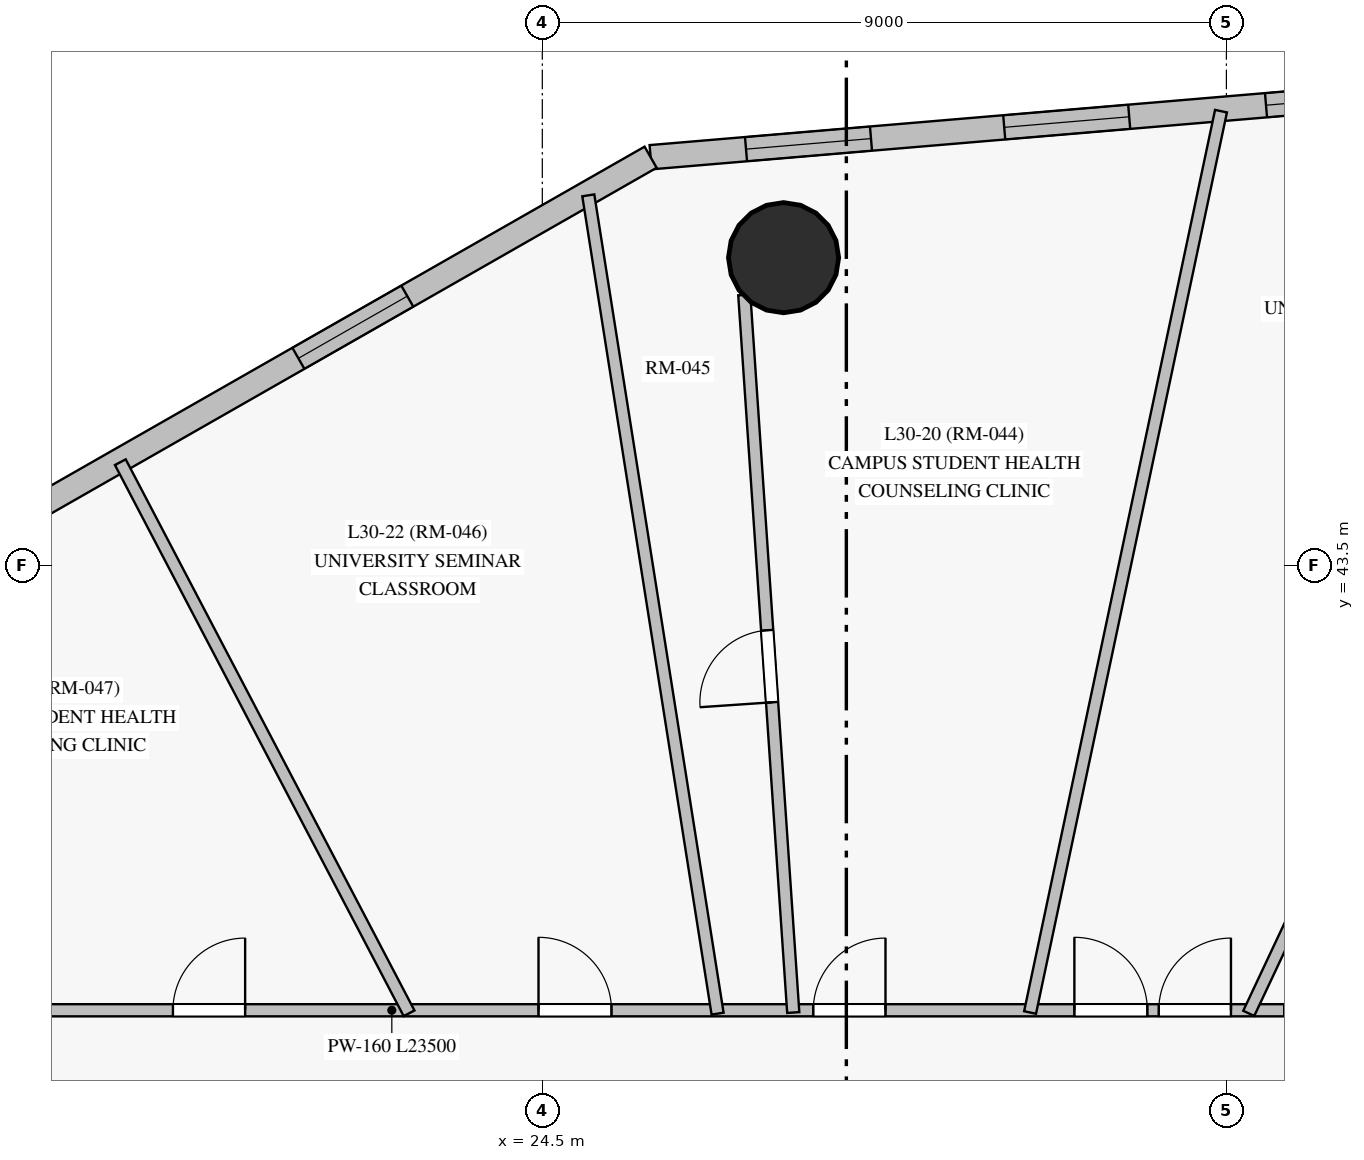
"""IFC4 building model, lengths in metres.
Left out: names, types, materials, properties, quantities, classifications, styles, units other than length and angle.
Written with IfcOpenShell. Run it as: python <this file> out.ifc"""

import sys

from ifc_helpers import new_model, si_unit, direction, frame, frame_2d, origin, origin_with_axes, origin_2d, place, context, subcontext, project, spatial, rectangle, circle, extrude, source, transform, mapped, element, fill, save


model = new_model("IFC4")
c1 = context("Model", 3, precision=1e-05, world=origin(), true_north=direction((0.0, 1.0)))
c2 = subcontext(c1, "Body", "Model", "MODEL_VIEW")
j1 = project(units=[si_unit("LENGTHUNIT", "METRE"), si_unit("PLANEANGLEUNIT", "RADIAN")], contexts=[c1])
p1 = place(None, origin())
s1 = spatial("IfcSite", under=j1, at=p1, CompositionType="ELEMENT")
p2 = place(p1, origin())
s2 = spatial("IfcBuilding", under=s1, at=p2, CompositionType="ELEMENT")
p3 = place(p2, frame((0.0, 0.0, 111.45)))
s3 = spatial("IfcBuildingStorey", under=s2, at=p3, CompositionType="ELEMENT", Elevation=111.45)
m1 = source(origin_with_axes(), c2, "Body", "SweptSolid", [
    extrude(circle(Radius=0.725, at=origin_2d()), origin(), (0.0, 0.0, 1.0), 3.05),
])
p4 = place(p3, frame((27.674, 47.551, 0.0), z_axis=(0.0, 0.0, 1.0), x_axis=(1.0, 0.0, 0.0)))
e1 = element("IfcColumn", 1, at=p4, inside=s3, PredefinedType="COLUMN", context=c2, shape_type="MappedRepresentation", body=[
    mapped(m1, transform((0.0, 0.0, 0.0), scale=1.0)),
])
p5 = place(p3, frame((35.632, 49.693, 0.0), z_axis=(0.0, 0.0, 1.0), x_axis=(-0.996452673848, -0.084155028263, 0.0)))
e2 = element("IfcWall", 2, at=p5, inside=s3, PredefinedType="SOLIDWALL", context=c2, shape_type="SweptSolid", body=[
    extrude(rectangle(XDim=9.742, YDim=0.32, at=frame_2d((4.871, 0.0))), origin(), (0.0, 0.0, 1.0), 2.825),
])
p6 = place(p5, frame((0.667, 0.0, 0.85)))
e3 = element("IfcOpeningElement", 3, at=p6, cuts=e2, PredefinedType="OPENING", context=c2, shape_type="SweptSolid", body=[
    extrude(rectangle(XDim=0.95, YDim=1.5, at=frame_2d((0.475, 0.75))), frame((0.0, 0.17, 0.0), z_axis=(0.0, -1.0, 0.0), x_axis=(1.0, 0.0, 0.0)), (0.0, 0.0, 1.0), 0.34),
])
p7 = place(p5, frame((3.423, 0.0, 0.85)))
e4 = element("IfcOpeningElement", 4, at=p7, cuts=e2, PredefinedType="OPENING", context=c2, shape_type="SweptSolid", body=[
    extrude(rectangle(XDim=1.65, YDim=1.65, at=frame_2d((0.825, 0.825))), frame((0.0, 0.17, 0.0), z_axis=(0.0, -1.0, 0.0), x_axis=(1.0, 0.0, 0.0)), (0.0, 0.0, 1.0), 0.34),
])
p8 = place(p5, frame((6.833, 0.0, 0.85)))
e5 = element("IfcOpeningElement", 5, at=p8, cuts=e2, PredefinedType="OPENING", context=c2, shape_type="SweptSolid", body=[
    extrude(rectangle(XDim=1.65, YDim=1.65, at=frame_2d((0.825, 0.825))), frame((0.0, 0.17, 0.0), z_axis=(0.0, -1.0, 0.0), x_axis=(1.0, 0.0, 0.0)), (0.0, 0.0, 1.0), 0.34),
])
p9 = place(p3, frame((25.925, 48.873, 0.0), z_axis=(0.0, 0.0, 1.0), x_axis=(-0.868415696325, -0.495836846529, 0.0)))
e6 = element("IfcWall", 6, at=p9, inside=s3, PredefinedType="SOLIDWALL", context=c2, shape_type="SweptSolid", body=[
    extrude(rectangle(XDim=14.101, YDim=0.32, at=frame_2d((7.05, 0.0))), origin(), (0.0, 0.0, 1.0), 2.825),
])
p10 = place(p9, frame((3.686, 0.0, 0.85)))
e7 = element("IfcOpeningElement", 7, at=p10, cuts=e6, PredefinedType="OPENING", context=c2, shape_type="SweptSolid", body=[
    extrude(rectangle(XDim=1.65, YDim=1.65, at=frame_2d((0.825, 0.825))), frame((0.0, 0.17, 0.0), z_axis=(0.0, -1.0, 0.0), x_axis=(1.0, 0.0, 0.0)), (0.0, 0.0, 1.0), 0.34),
])
p11 = place(p9, frame((10.22, 0.0, 0.85)))
e8 = element("IfcOpeningElement", 8, at=p11, cuts=e6, PredefinedType="OPENING", context=c2, shape_type="SweptSolid", body=[
    extrude(rectangle(XDim=1.65, YDim=1.65, at=frame_2d((0.825, 0.825))), frame((0.0, 0.17, 0.0), z_axis=(0.0, -1.0, 0.0), x_axis=(1.0, 0.0, 0.0)), (0.0, 0.0, 1.0), 0.34),
])
p12 = place(p3, frame((16.7, 37.65, 0.0), z_axis=(0.0, 0.0, 1.0), x_axis=(1.0, 0.0, 0.0)))
e9 = element("IfcWall", 9, at=p12, inside=s3, PredefinedType="PARTITIONING", context=c2, shape_type="SweptSolid", body=[
    extrude(rectangle(XDim=23.5, YDim=0.16, at=frame_2d((11.75, 0.0))), origin(), (0.0, 0.0, 1.0), 2.325),
])
p13 = place(p12, frame((20.456, 0.0, 0.0)))
e10 = element("IfcOpeningElement", 10, at=p13, cuts=e9, PredefinedType="OPENING", context=c2, shape_type="SweptSolid", body=[
    extrude(rectangle(XDim=0.96, YDim=2.15, at=frame_2d((0.48, 1.075))), frame((0.0, 0.09, 0.0), z_axis=(0.0, -1.0, 0.0), x_axis=(1.0, 0.0, 0.0)), (0.0, 0.0, 1.0), 0.18),
])
p14 = place(p12, frame((19.359, 0.0, 0.0)))
e11 = element("IfcOpeningElement", 11, at=p14, cuts=e9, PredefinedType="OPENING", context=c2, shape_type="SweptSolid", body=[
    extrude(rectangle(XDim=0.95, YDim=2.15, at=frame_2d((0.475, 1.075))), frame((0.0, 0.09, 0.0), z_axis=(0.0, -1.0, 0.0), x_axis=(1.0, 0.0, 0.0)), (0.0, 0.0, 1.0), 0.18),
])
p15 = place(p12, frame((15.91, 0.0, 0.0)))
e12 = element("IfcOpeningElement", 12, at=p15, cuts=e9, PredefinedType="OPENING", context=c2, shape_type="SweptSolid", body=[
    extrude(rectangle(XDim=0.95, YDim=2.15, at=frame_2d((0.475, 1.075))), frame((0.0, 0.09, 0.0), z_axis=(0.0, -1.0, 0.0), x_axis=(1.0, 0.0, 0.0)), (0.0, 0.0, 1.0), 0.18),
])
p16 = place(p12, frame((14.8, 0.0, 0.0)))
e13 = element("IfcOpeningElement", 13, at=p16, cuts=e9, PredefinedType="OPENING", context=c2, shape_type="SweptSolid", body=[
    extrude(rectangle(XDim=0.96, YDim=2.15, at=frame_2d((0.48, 1.075))), frame((0.0, 0.09, 0.0), z_axis=(0.0, -1.0, 0.0), x_axis=(1.0, 0.0, 0.0)), (0.0, 0.0, 1.0), 0.18),
])
p17 = place(p12, frame((11.365, 0.0, 0.0)))
e14 = element("IfcOpeningElement", 14, at=p17, cuts=e9, PredefinedType="OPENING", context=c2, shape_type="SweptSolid", body=[
    extrude(rectangle(XDim=0.95, YDim=2.15, at=frame_2d((0.475, 1.075))), frame((0.0, 0.09, 0.0), z_axis=(0.0, -1.0, 0.0), x_axis=(1.0, 0.0, 0.0)), (0.0, 0.0, 1.0), 0.18),
])
p18 = place(p12, frame((7.75, 0.0, 0.0)))
e15 = element("IfcOpeningElement", 15, at=p18, cuts=e9, PredefinedType="OPENING", context=c2, shape_type="SweptSolid", body=[
    extrude(rectangle(XDim=0.96, YDim=2.15, at=frame_2d((0.48, 1.075))), frame((0.0, 0.09, 0.0), z_axis=(0.0, -1.0, 0.0), x_axis=(1.0, 0.0, 0.0)), (0.0, 0.0, 1.0), 0.18),
])
p19 = place(p12, frame((2.94, 0.0, 0.0)))
e16 = element("IfcOpeningElement", 16, at=p19, cuts=e9, PredefinedType="OPENING", context=c2, shape_type="SweptSolid", body=[
    extrude(rectangle(XDim=0.95, YDim=2.15, at=frame_2d((0.475, 1.075))), frame((0.0, 0.09, 0.0), z_axis=(0.0, -1.0, 0.0), x_axis=(1.0, 0.0, 0.0)), (0.0, 0.0, 1.0), 0.18),
])
p20 = place(p12, frame((17.561, 0.0, 0.0)))
e17 = element("IfcOpeningElement", 17, at=p20, cuts=e9, PredefinedType="OPENING", context=c2, shape_type="SweptSolid", body=[
    extrude(rectangle(XDim=0.86, YDim=2.04, at=frame_2d((0.43, 1.02))), frame((0.0, 0.09, 0.0), z_axis=(0.0, -1.0, 0.0), x_axis=(1.0, 0.0, 0.0)), (0.0, 0.0, 1.0), 0.18),
])
p21 = place(p3, frame((30.917, 37.621, 0.0), z_axis=(0.0, 0.0, 1.0), x_axis=(0.207235529674, 0.978291078995, 0.0)))
e18 = element("IfcWall", 18, at=p21, inside=s3, PredefinedType="PARTITIONING", context=c2, shape_type="SweptSolid", body=[
    extrude(rectangle(XDim=12.121, YDim=0.16, at=frame_2d((6.061, 0.0))), origin(), (0.0, 0.0, 1.0), 2.825),
])
p22 = place(p3, frame((33.794, 37.609, 0.0), z_axis=(0.0, 0.0, 1.0), x_axis=(0.425784012036, 0.904824831166, 0.0)))
e19 = element("IfcWall", 19, at=p22, inside=s3, PredefinedType="PARTITIONING", context=c2, shape_type="SweptSolid", body=[
    extrude(rectangle(XDim=11.736, YDim=0.16, at=frame_2d((5.868, 0.0))), origin(), (0.0, 0.0, 1.0), 2.825),
])
p23 = place(p3, frame((26.806, 37.606, 0.0), z_axis=(0.0, 0.0, 1.0), x_axis=(-0.156063798383, 0.987746977132, 0.0)))
e20 = element("IfcWall", 20, at=p23, inside=s3, PredefinedType="PARTITIONING", context=c2, shape_type="SweptSolid", body=[
    extrude(rectangle(XDim=10.899, YDim=0.16, at=frame_2d((5.449, 0.0))), origin(), (0.0, 0.0, 1.0), 2.225),
])
p24 = place(p3, frame((27.802, 37.62, 0.0), z_axis=(0.0, 0.0, 1.0), x_axis=(-0.068058322418, 0.997681344293, 0.0)))
e21 = element("IfcWall", 21, at=p24, inside=s3, PredefinedType="PARTITIONING", context=c2, shape_type="SweptSolid", body=[
    extrude(rectangle(XDim=9.463, YDim=0.16, at=frame_2d((4.731, 0.0))), origin(), (0.0, 0.0, 1.0), 2.225),
])
p25 = place(p24, frame((4.091, 0.0, 0.0)))
e22 = element("IfcOpeningElement", 22, at=p25, cuts=e21, PredefinedType="OPENING", context=c2, shape_type="SweptSolid", body=[
    extrude(rectangle(XDim=0.95, YDim=2.15, at=frame_2d((0.475, 1.075))), frame((0.0, 0.09, 0.0), z_axis=(0.0, -1.0, 0.0), x_axis=(1.0, 0.0, 0.0)), (0.0, 0.0, 1.0), 0.18),
])
p26 = place(p3, frame((22.747, 37.61, 0.0), z_axis=(0.0, 0.0, 1.0), x_axis=(-0.464074979272, 0.885795920974, 0.0)))
e23 = element("IfcWall", 23, at=p26, inside=s3, PredefinedType="PARTITIONING", context=c2, shape_type="SweptSolid", body=[
    extrude(rectangle(XDim=8.185, YDim=0.16, at=frame_2d((4.093, 0.0))), origin(), (0.0, 0.0, 1.0), 2.825),
])
m2 = source(origin_with_axes(), c2, "Body", "SweptSolid", [
    extrude(rectangle(XDim=0.95, YDim=1.5, at=frame_2d((0.475, 0.75))), frame((0.0, 0.03, 0.0), z_axis=(0.0, -1.0, 0.0), x_axis=(1.0, 0.0, 0.0)), (0.0, 0.0, 1.0), 0.06),
])
p27 = place(p6, origin())
e24 = element("IfcWindow", 24, at=p27, inside=s3, PartitioningType="SINGLE_PANEL", PredefinedType="WINDOW", context=c2, shape_type="MappedRepresentation", body=[
    mapped(m2, transform((0.0, 0.0, 0.0), scale=1.0)),
])
fill(e3, e24)
m3 = source(origin_with_axes(), c2, "Body", "SweptSolid", [
    extrude(rectangle(XDim=1.65, YDim=1.65, at=frame_2d((0.825, 0.825))), frame((0.0, 0.03, 0.0), z_axis=(0.0, -1.0, 0.0), x_axis=(1.0, 0.0, 0.0)), (0.0, 0.0, 1.0), 0.06),
])
p28 = place(p7, origin())
e25 = element("IfcWindow", 25, at=p28, inside=s3, PartitioningType="SINGLE_PANEL", PredefinedType="WINDOW", context=c2, shape_type="MappedRepresentation", body=[
    mapped(m3, transform((0.0, 0.0, 0.0), scale=1.0)),
])
fill(e4, e25)
p29 = place(p8, origin())
e26 = element("IfcWindow", 26, at=p29, inside=s3, PartitioningType="SINGLE_PANEL", PredefinedType="WINDOW", context=c2, shape_type="MappedRepresentation", body=[
    mapped(m3, transform((0.0, 0.0, 0.0), scale=1.0)),
])
fill(e5, e26)
p30 = place(p10, origin())
e27 = element("IfcWindow", 27, at=p30, inside=s3, PartitioningType="SINGLE_PANEL", PredefinedType="WINDOW", context=c2, shape_type="MappedRepresentation", body=[
    mapped(m3, transform((0.0, 0.0, 0.0), scale=1.0)),
])
fill(e7, e27)
m4 = source(origin_with_axes(), c2, "Body", "SweptSolid", [
    extrude(rectangle(XDim=0.95, YDim=2.15, at=frame_2d((0.475, 1.075))), frame((0.0, 0.025, 0.0), z_axis=(0.0, -1.0, 0.0), x_axis=(1.0, 0.0, 0.0)), (0.0, 0.0, 1.0), 0.05),
])
p31 = place(p15, origin())
e28 = element("IfcDoor", 28, at=p31, inside=s3, OperationType="SINGLE_SWING_RIGHT", PredefinedType="DOOR", context=c2, shape_type="MappedRepresentation", body=[
    mapped(m4, transform((0.0, 0.0, 0.0), scale=1.0)),
])
fill(e12, e28)
m5 = source(origin_with_axes(), c2, "Body", "SweptSolid", [
    extrude(rectangle(XDim=0.96, YDim=2.15, at=frame_2d((0.48, 1.075))), frame((0.0, 0.025, 0.0), z_axis=(0.0, -1.0, 0.0), x_axis=(1.0, 0.0, 0.0)), (0.0, 0.0, 1.0), 0.05),
])
p32 = place(p16, origin())
e29 = element("IfcDoor", 29, at=p32, inside=s3, OperationType="SINGLE_SWING_LEFT", PredefinedType="DOOR", context=c2, shape_type="MappedRepresentation", body=[
    mapped(m5, transform((0.0, 0.0, 0.0), scale=1.0)),
])
fill(e13, e29)
p33 = place(p17, origin())
e30 = element("IfcDoor", 30, at=p33, inside=s3, OperationType="SINGLE_SWING_RIGHT", PredefinedType="DOOR", context=c2, shape_type="MappedRepresentation", body=[
    mapped(m4, transform((0.0, 0.0, 0.0), scale=1.0)),
])
fill(e14, e30)
p34 = place(p18, origin())
e31 = element("IfcDoor", 31, at=p34, inside=s3, OperationType="SINGLE_SWING_LEFT", PredefinedType="DOOR", context=c2, shape_type="MappedRepresentation", body=[
    mapped(m5, transform((0.0, 0.0, 0.0), scale=1.0)),
])
fill(e15, e31)
p35 = place(p19, origin())
e32 = element("IfcDoor", 32, at=p35, inside=s3, OperationType="SINGLE_SWING_RIGHT", PredefinedType="DOOR", context=c2, shape_type="MappedRepresentation", body=[
    mapped(m4, transform((0.0, 0.0, 0.0), scale=1.0)),
])
fill(e16, e32)
p36 = place(p25, origin())
e33 = element("IfcDoor", 33, at=p36, inside=s3, OperationType="SINGLE_SWING_LEFT", PredefinedType="DOOR", context=c2, shape_type="MappedRepresentation", body=[
    mapped(m4, transform((0.0, 0.0, 0.0), scale=1.0)),
])
fill(e22, e33)
save(model, sys.argv[1])
